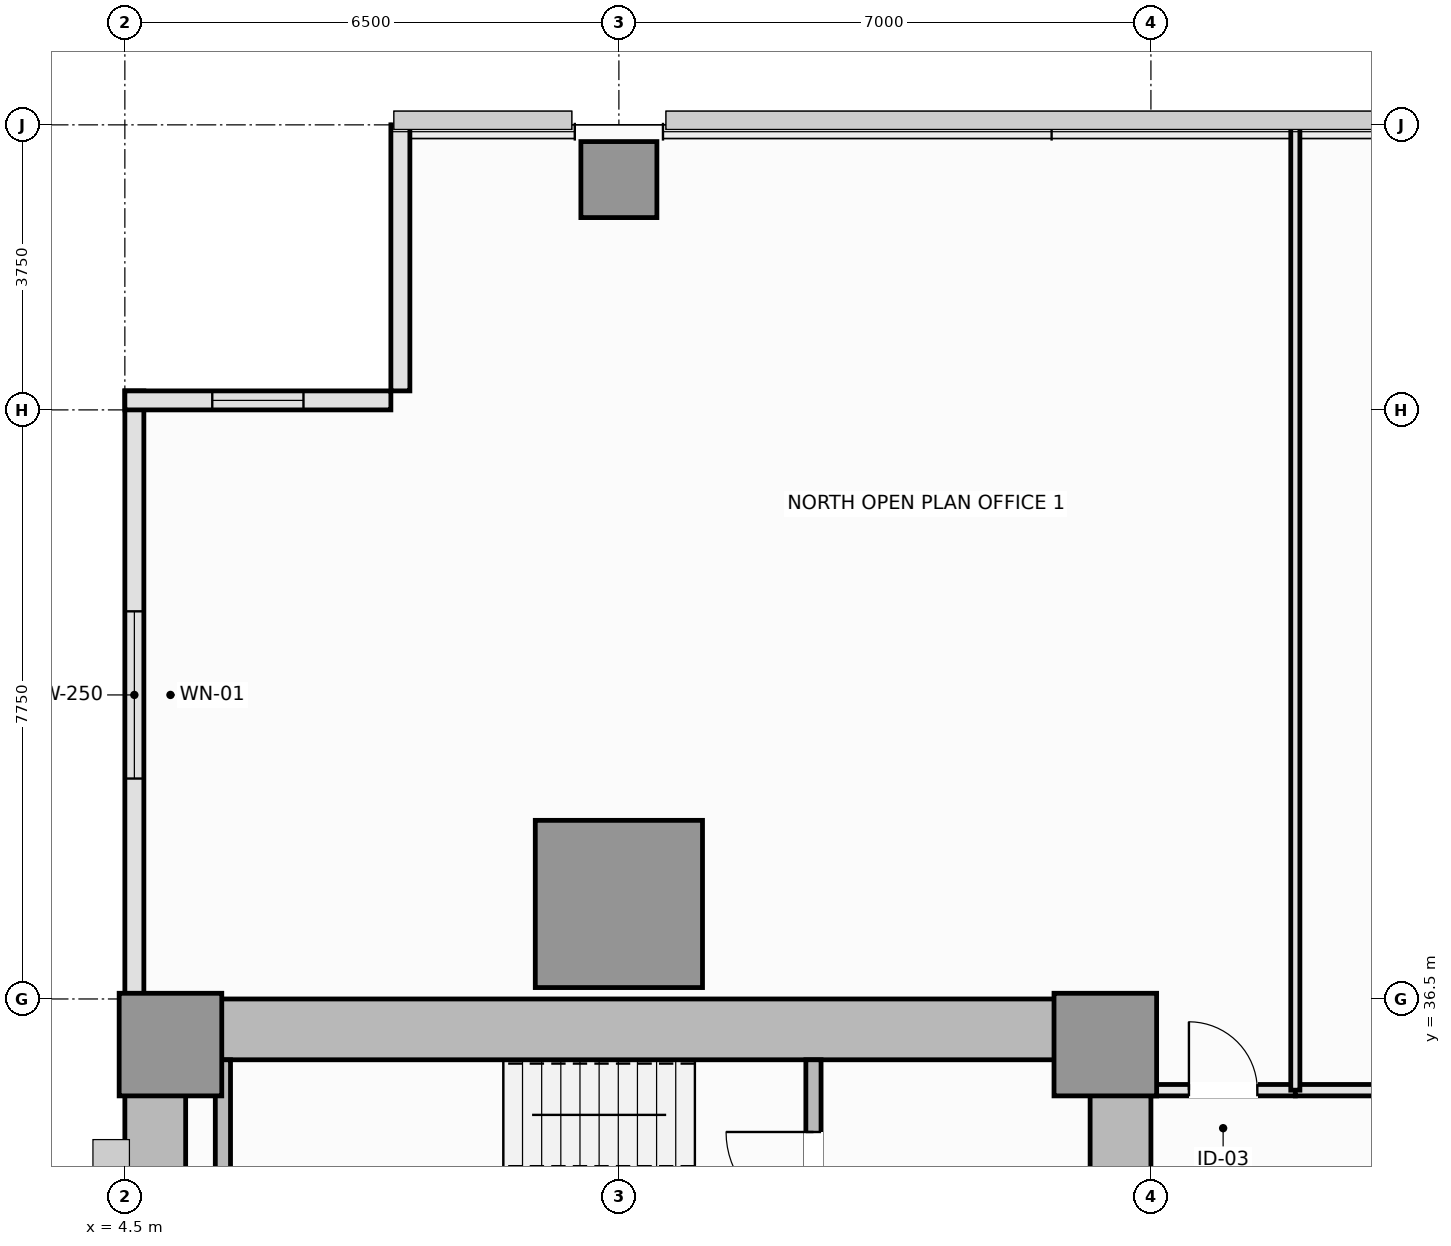
"""IFC4 building model, lengths in metres.
Left out: names, types, materials, properties, quantities, classifications, styles, units other than length and angle.
Written with IfcOpenShell. Run it as: python <this file> out.ifc"""

import sys

from ifc_helpers import new_model, si_unit, direction, frame, frame_2d, origin, origin_2d, place, context, subcontext, project, spatial, rectangle, extrude, element, fill, save


model = new_model("IFC4")
c1 = context("Model", 3, precision=1e-05, world=origin(), true_north=direction((0.0, 1.0)))
c2 = subcontext(c1, "Body", "Model", "MODEL_VIEW")
j1 = project(units=[si_unit("LENGTHUNIT", "METRE"), si_unit("PLANEANGLEUNIT", "RADIAN")], contexts=[c1])
p1 = place(None, origin())
s1 = spatial("IfcSite", under=j1, at=p1, CompositionType="ELEMENT")
p2 = place(p1, origin())
s2 = spatial("IfcBuilding", under=s1, at=p2, CompositionType="ELEMENT")
p3 = place(p2, frame((0.0, 0.0, 39.8)))
s3 = spatial("IfcBuildingStorey", under=s2, at=p3, CompositionType="ELEMENT", Elevation=39.8)
p4 = place(p3, frame((4.5, 36.1, 0.0), z_axis=(0.0, 0.0, 1.0), x_axis=(1.0, 0.0, 0.0)))
e1 = element("IfcWall", 1, at=p4, inside=s3, PredefinedType="SHEAR", context=c2, shape_type="SweptSolid", body=[
    extrude(rectangle(XDim=13.5, YDim=0.8, at=frame_2d((6.75, 0.0))), origin(), (0.0, 0.0, 1.0), 3.55),
])
p5 = place(p3, frame((4.9, 14.8, 0.0), z_axis=(0.0, 0.0, 1.0), x_axis=(0.0, 1.0, 0.0)))
e2 = element("IfcWall", 2, at=p5, inside=s3, PredefinedType="SHEAR", context=c2, shape_type="SweptSolid", body=[
    extrude(rectangle(XDim=20.9, YDim=0.8, at=frame_2d((10.45, 0.0))), origin(), (0.0, 0.0, 1.0), 3.55),
])
p6 = place(p3, frame((17.6, 27.05, 0.0), z_axis=(0.0, 0.0, 1.0), x_axis=(0.0, 1.0, 0.0)))
e3 = element("IfcWall", 3, at=p6, inside=s3, PredefinedType="SHEAR", context=c2, shape_type="SweptSolid", body=[
    extrude(rectangle(XDim=8.65, YDim=0.8, at=frame_2d((4.325, 0.0))), origin(), (0.0, 0.0, 1.0), 3.55),
])
p7 = place(p6, frame((3.45, 0.0, 0.0)))
e4 = element("IfcOpeningElement", 4, at=p7, cuts=e3, PredefinedType="OPENING", context=c2, shape_type="SweptSolid", body=[
    extrude(rectangle(XDim=1.1, YDim=2.15, at=frame_2d((0.55, 1.075))), frame((0.0, 0.41, 0.0), z_axis=(0.0, -1.0, 0.0), x_axis=(1.0, 0.0, 0.0)), (0.0, 0.0, 1.0), 0.82),
])
for number, where, z_axis, x_axis in (
    (5, (5.1, 35.9, 0.0), (0.0, 0.0, 1.0), (1.0, 0.0, 0.0)),
    (6, (17.4, 35.9, 0.0), (0.0, 0.0, 1.0), (1.0, 0.0, 0.0)),
):
    element("IfcColumn", number, at=place(p3, frame(where, z_axis=z_axis, x_axis=x_axis)), inside=s3, PredefinedType="PILASTER", context=c2, shape_type="SweptSolid", body=[
        extrude(rectangle(XDim=1.35, YDim=1.35, at=origin_2d()), origin(), (0.0, 0.0, 1.0), 3.55),
    ])
p8 = place(p3, frame((11.0, 37.75, 0.0), z_axis=(0.0, 0.0, 1.0), x_axis=(1.0, 0.0, 0.0)))
e7 = element("IfcColumn", 7, at=p8, inside=s3, PredefinedType="COLUMN", context=c2, shape_type="SweptSolid", body=[
    extrude(rectangle(XDim=2.2, YDim=2.2, at=origin_2d()), origin(), (0.0, 0.0, 1.0), 3.55),
])
p9 = place(p3, frame((11.0, 47.28, 0.0), z_axis=(0.0, 0.0, 1.0), x_axis=(1.0, 0.0, 0.0)))
e8 = element("IfcColumn", 8, at=p9, inside=s3, PredefinedType="COLUMN", context=c2, shape_type="SweptSolid", body=[
    extrude(rectangle(XDim=1.0, YDim=1.0, at=origin_2d()), origin(), (0.0, 0.0, 1.0), 3.55),
])
p10 = place(p3, frame((4.625, 44.5, 0.0), z_axis=(0.0, 0.0, 1.0), x_axis=(0.0, -1.0, 0.0)))
e9 = element("IfcWall", 9, at=p10, inside=s3, PredefinedType="SOLIDWALL", context=c2, shape_type="SweptSolid", body=[
    extrude(rectangle(XDim=8.0, YDim=0.25, at=frame_2d((4.0, 0.0))), origin(), (0.0, 0.0, 1.0), 3.37),
])
p11 = place(p10, frame((2.9, 0.0, 0.9)))
e10 = element("IfcOpeningElement", 10, at=p11, cuts=e9, PredefinedType="OPENING", context=c2, shape_type="SweptSolid", body=[
    extrude(rectangle(XDim=2.2, YDim=1.8, at=frame_2d((1.1, 0.9))), frame((0.0, 0.135, 0.0), z_axis=(0.0, -1.0, 0.0), x_axis=(1.0, 0.0, 0.0)), (0.0, 0.0, 1.0), 0.27),
])
p12 = place(p3, frame((8.125, 48.0, 0.0), z_axis=(0.0, 0.0, 1.0), x_axis=(0.0, -1.0, 0.0)))
e11 = element("IfcWall", 11, at=p12, inside=s3, PredefinedType="SOLIDWALL", context=c2, shape_type="SweptSolid", body=[
    extrude(rectangle(XDim=3.5, YDim=0.25, at=frame_2d((1.75, 0.0))), origin(), (0.0, 0.0, 1.0), 3.37),
])
p13 = place(p3, frame((8.0, 44.375, 0.0), z_axis=(0.0, 0.0, 1.0), x_axis=(-1.0, 0.0, 0.0)))
e12 = element("IfcWall", 12, at=p13, inside=s3, PredefinedType="SOLIDWALL", context=c2, shape_type="SweptSolid", body=[
    extrude(rectangle(XDim=3.5, YDim=0.25, at=frame_2d((1.75, 0.0))), origin(), (0.0, 0.0, 1.0), 3.37),
])
p14 = place(p13, frame((1.15, 0.0, 0.9)))
e13 = element("IfcOpeningElement", 13, at=p14, cuts=e12, PredefinedType="OPENING", context=c2, shape_type="SweptSolid", body=[
    extrude(rectangle(XDim=1.2, YDim=1.8, at=frame_2d((0.6, 0.9))), frame((0.0, 0.135, 0.0), z_axis=(0.0, -1.0, 0.0), x_axis=(1.0, 0.0, 0.0)), (0.0, 0.0, 1.0), 0.27),
])
p15 = place(p3, frame((5.79, 32.65, 0.0), z_axis=(0.0, 0.0, 1.0), x_axis=(0.0, 1.0, 0.0)))
e14 = element("IfcWall", 14, at=p15, inside=s3, PredefinedType="SOLIDWALL", context=c2, shape_type="SweptSolid", body=[
    extrude(rectangle(XDim=3.05, YDim=0.2, at=frame_2d((1.525, 0.0))), origin(), (0.0, 0.0, 1.0), 3.55),
])
p16 = place(p3, frame((13.56, 32.65, 0.0), z_axis=(0.0, 0.0, 1.0), x_axis=(0.0, 1.0, 0.0)))
e15 = element("IfcWall", 15, at=p16, inside=s3, PredefinedType="SOLIDWALL", context=c2, shape_type="SweptSolid", body=[
    extrude(rectangle(XDim=3.05, YDim=0.2, at=frame_2d((1.525, 0.0))), origin(), (0.0, 0.0, 1.0), 3.55),
])
p17 = place(p16, frame((0.95, 0.0, 0.0)))
e16 = element("IfcOpeningElement", 16, at=p17, cuts=e15, PredefinedType="OPENING", context=c2, shape_type="SweptSolid", body=[
    extrude(rectangle(XDim=1.15, YDim=2.15, at=frame_2d((0.575, 1.075))), frame((0.0, 0.11, 0.0), z_axis=(0.0, -1.0, 0.0), x_axis=(1.0, 0.0, 0.0)), (0.0, 0.0, 1.0), 0.22),
])
p18 = place(p3, frame((18.0, 35.3, 0.0), z_axis=(0.0, 0.0, 1.0), x_axis=(1.0, 0.0, 0.0)))
e17 = element("IfcWall", 17, at=p18, inside=s3, PredefinedType="PARTITIONING", context=c2, shape_type="SweptSolid", body=[
    extrude(rectangle(XDim=1.9, YDim=0.15, at=frame_2d((0.95, 0.0))), origin(), (0.0, 0.0, 1.0), 3.37),
])
p19 = place(p18, frame((0.5, 0.0, 0.0)))
e18 = element("IfcOpeningElement", 18, at=p19, cuts=e17, PredefinedType="OPENING", context=c2, shape_type="SweptSolid", body=[
    extrude(rectangle(XDim=0.9, YDim=2.1, at=frame_2d((0.45, 1.05))), frame((0.0, 0.085, 0.0), z_axis=(0.0, -1.0, 0.0), x_axis=(1.0, 0.0, 0.0)), (0.0, 0.0, 1.0), 0.17),
])
p20 = place(p3, frame((19.9, 35.3, 0.0), z_axis=(0.0, 0.0, 1.0), x_axis=(1.0, 0.0, 0.0)))
e19 = element("IfcWall", 19, at=p20, inside=s3, PredefinedType="PARTITIONING", context=c2, shape_type="SweptSolid", body=[
    extrude(rectangle(XDim=7.6, YDim=0.15, at=frame_2d((3.8, 0.0))), origin(), (0.0, 0.0, 1.0), 3.37),
])
p21 = place(p20, frame((3.3, 0.0, 0.0)))
e20 = element("IfcOpeningElement", 20, at=p21, cuts=e19, PredefinedType="OPENING", context=c2, shape_type="SweptSolid", body=[
    extrude(rectangle(XDim=1.0, YDim=2.15, at=frame_2d((0.5, 1.075))), frame((0.0, 0.085, 0.0), z_axis=(0.0, -1.0, 0.0), x_axis=(1.0, 0.0, 0.0)), (0.0, 0.0, 1.0), 0.17),
])
p22 = place(p3, frame((19.9, 35.3, 0.0), z_axis=(0.0, 0.0, 1.0), x_axis=(0.0, 1.0, 0.0)))
e21 = element("IfcWall", 21, at=p22, inside=s3, PredefinedType="PARTITIONING", context=c2, shape_type="SweptSolid", body=[
    extrude(rectangle(XDim=12.69, YDim=0.12, at=frame_2d((6.345, 0.0))), origin(), (0.0, 0.0, 1.0), 3.37),
])
p23 = place(p11, origin())
e22 = element("IfcWindow", 22, at=p23, inside=s3, PartitioningType="SINGLE_PANEL", PredefinedType="WINDOW", context=c2, shape_type="SweptSolid", body=[
    extrude(rectangle(XDim=2.2, YDim=1.8, at=frame_2d((1.1, 0.9))), frame((0.0, 0.03, 0.0), z_axis=(0.0, -1.0, 0.0), x_axis=(1.0, 0.0, 0.0)), (0.0, 0.0, 1.0), 0.06),
])
fill(e10, e22)
p24 = place(p14, origin())
e23 = element("IfcWindow", 23, at=p24, inside=s3, PartitioningType="SINGLE_PANEL", PredefinedType="WINDOW", context=c2, shape_type="SweptSolid", body=[
    extrude(rectangle(XDim=1.2, YDim=1.8, at=frame_2d((0.6, 0.9))), frame((0.0, 0.03, 0.0), z_axis=(0.0, -1.0, 0.0), x_axis=(1.0, 0.0, 0.0)), (0.0, 0.0, 1.0), 0.06),
])
fill(e13, e23)
p25 = place(p17, origin())
e24 = element("IfcDoor", 24, at=p25, inside=s3, OperationType="SINGLE_SWING_RIGHT", PredefinedType="DOOR", context=c2, shape_type="SweptSolid", body=[
    extrude(rectangle(XDim=1.15, YDim=2.15, at=frame_2d((0.575, 1.075))), frame((0.0, 0.025, 0.0), z_axis=(0.0, -1.0, 0.0), x_axis=(1.0, 0.0, 0.0)), (0.0, 0.0, 1.0), 0.05),
])
fill(e16, e24)
p26 = place(p19, origin())
e25 = element("IfcDoor", 25, at=p26, inside=s3, OperationType="SINGLE_SWING_LEFT", PredefinedType="DOOR", context=c2, shape_type="SweptSolid", body=[
    extrude(rectangle(XDim=0.9, YDim=2.1, at=frame_2d((0.45, 1.05))), frame((0.0, 0.025, 0.0), z_axis=(0.0, -1.0, 0.0), x_axis=(1.0, 0.0, 0.0)), (0.0, 0.0, 1.0), 0.05),
])
fill(e18, e25)
save(model, sys.argv[1])
